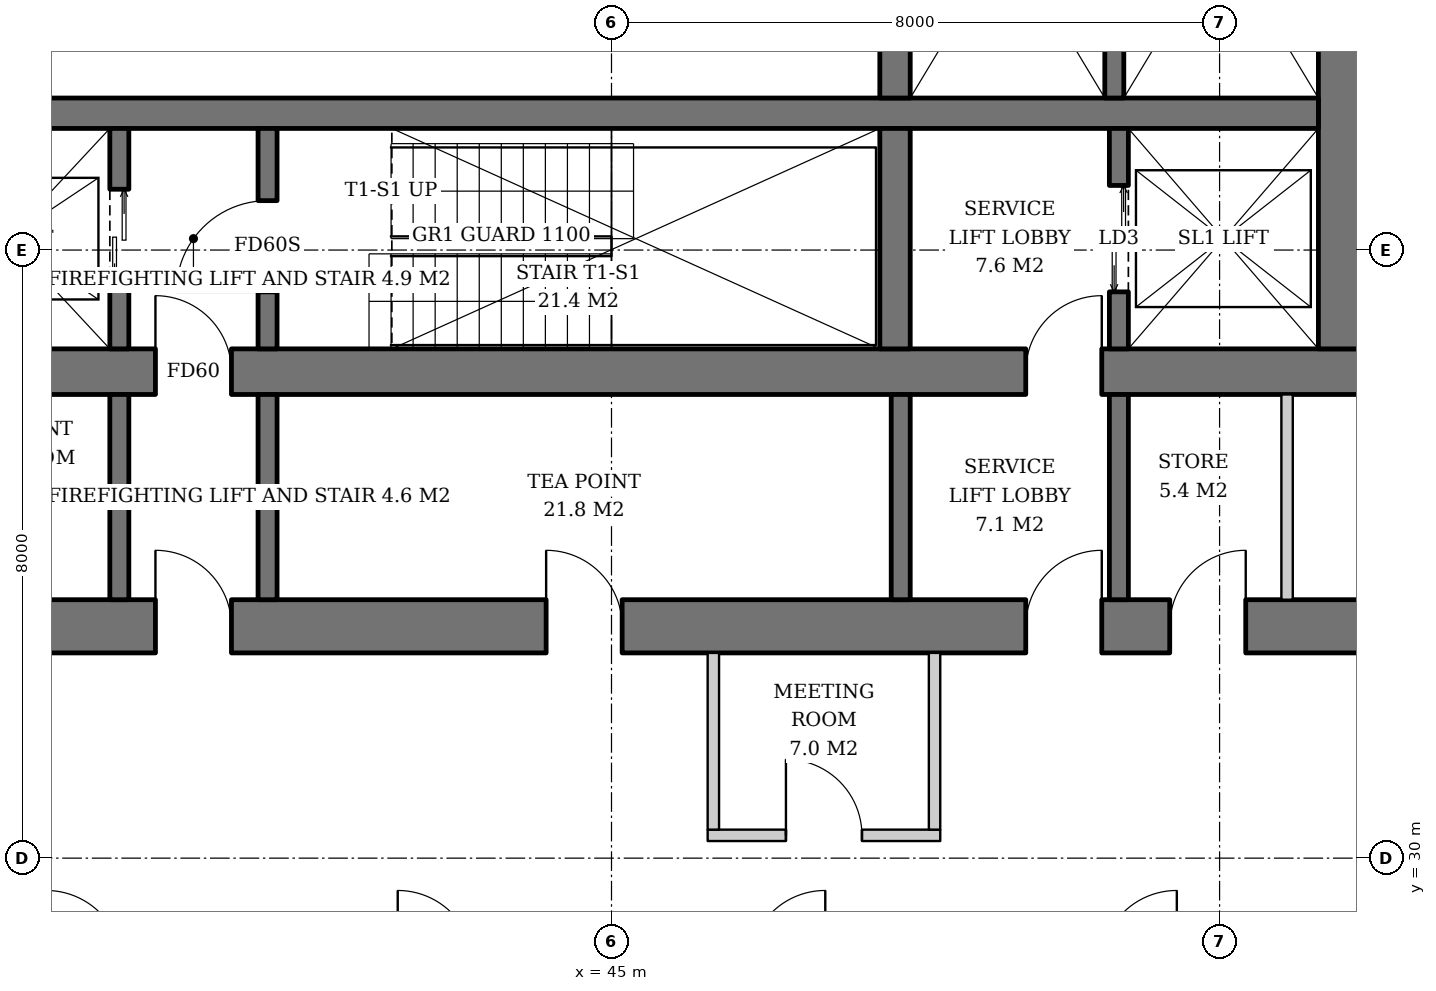
"""IFC4 building model, lengths in metres.
Left out: names, types, materials, properties, quantities, classifications, styles, units other than length and angle.
Written with IfcOpenShell. Run it as: python <this file> out.ifc"""

import sys

from ifc_helpers import new_model, si_unit, direction, frame, frame_2d, origin, place, context, subcontext, project, spatial, rectangle, extrude, element, fill, save


model = new_model("IFC4")
c1 = context("Model", 3, precision=1e-05, world=origin(), true_north=direction((0.0, 1.0)))
c2 = subcontext(c1, "Body", "Model", "MODEL_VIEW")
j1 = project(units=[si_unit("LENGTHUNIT", "METRE"), si_unit("PLANEANGLEUNIT", "RADIAN")], contexts=[c1])
p1 = place(None, origin())
s1 = spatial("IfcSite", under=j1, at=p1, CompositionType="ELEMENT")
p2 = place(p1, origin())
s2 = spatial("IfcBuilding", under=s1, at=p2, CompositionType="ELEMENT")
p3 = place(p2, frame((0.0, 0.0, 150.2)))
s3 = spatial("IfcBuildingStorey", under=s2, at=p3, CompositionType="ELEMENT", Elevation=150.2)
p4 = place(p3, frame((35.1, 36.4, 0.0), z_axis=(0.0, 0.0, 1.0), x_axis=(1.0, 0.0, 0.0)))
e1 = element("IfcWall", 1, at=p4, inside=s3, PredefinedType="SHEAR", context=c2, shape_type="SweptSolid", body=[
    extrude(rectangle(XDim=19.8, YDim=0.6, at=frame_2d((9.9, 0.0))), origin(), (0.0, 0.0, 1.0), 3.8),
])
p5 = place(p4, frame((3.9, 0.0, 0.0)))
e2 = element("IfcOpeningElement", 2, at=p5, cuts=e1, PredefinedType="OPENING", context=c2, shape_type="SweptSolid", body=[
    extrude(rectangle(XDim=1.0, YDim=2.1, at=frame_2d((0.5, 1.05))), frame((0.0, 0.31, 0.0), z_axis=(0.0, -1.0, 0.0), x_axis=(1.0, 0.0, 0.0)), (0.0, 0.0, 1.0), 0.62),
])
p6 = place(p4, frame((15.35, 0.0, 0.0)))
e3 = element("IfcOpeningElement", 3, at=p6, cuts=e1, PredefinedType="OPENING", context=c2, shape_type="SweptSolid", body=[
    extrude(rectangle(XDim=1.0, YDim=2.1, at=frame_2d((0.5, 1.05))), frame((0.0, 0.31, 0.0), z_axis=(0.0, -1.0, 0.0), x_axis=(1.0, 0.0, 0.0)), (0.0, 0.0, 1.0), 0.62),
])
p7 = place(p3, frame((54.6, 36.7, 0.0), z_axis=(0.0, 0.0, 1.0), x_axis=(0.0, 1.0, 0.0)))
e4 = element("IfcWall", 4, at=p7, inside=s3, PredefinedType="SHEAR", context=c2, shape_type="SweptSolid", body=[
    extrude(rectangle(XDim=18.6, YDim=0.6, at=frame_2d((9.3, 0.0))), origin(), (0.0, 0.0, 1.0), 3.8),
])
p8 = place(p7, frame((8.4, 0.0, 0.0)))
e5 = element("IfcOpeningElement", 5, at=p8, cuts=e4, PredefinedType="OPENING", context=c2, shape_type="SweptSolid", body=[
    extrude(rectangle(XDim=1.8, YDim=2.4, at=frame_2d((0.9, 1.2))), frame((0.0, 0.31, 0.0), z_axis=(0.0, -1.0, 0.0), x_axis=(1.0, 0.0, 0.0)), (0.0, 0.0, 1.0), 0.62),
])
p9 = place(p3, frame((31.7, 33.05, 0.0), z_axis=(0.0, 0.0, 1.0), x_axis=(1.0, 0.0, 0.0)))
e6 = element("IfcWall", 6, at=p9, inside=s3, PredefinedType="SHEAR", context=c2, shape_type="SweptSolid", body=[
    extrude(rectangle(XDim=26.6, YDim=0.7, at=frame_2d((13.3, 0.0))), origin(), (0.0, 0.0, 1.0), 3.8),
])
p10 = place(p9, frame((7.3, 0.0, 0.0)))
e7 = element("IfcOpeningElement", 7, at=p10, cuts=e6, PredefinedType="OPENING", context=c2, shape_type="SweptSolid", body=[
    extrude(rectangle(XDim=1.0, YDim=2.1, at=frame_2d((0.5, 1.05))), frame((0.0, 0.36, 0.0), z_axis=(0.0, -1.0, 0.0), x_axis=(1.0, 0.0, 0.0)), (0.0, 0.0, 1.0), 0.72),
])
p11 = place(p9, frame((18.75, 0.0, 0.0)))
e8 = element("IfcOpeningElement", 8, at=p11, cuts=e6, PredefinedType="OPENING", context=c2, shape_type="SweptSolid", body=[
    extrude(rectangle(XDim=1.0, YDim=2.1, at=frame_2d((0.5, 1.05))), frame((0.0, 0.36, 0.0), z_axis=(0.0, -1.0, 0.0), x_axis=(1.0, 0.0, 0.0)), (0.0, 0.0, 1.0), 0.72),
])
p12 = place(p9, frame((1.85, 0.0, 0.0)))
e9 = element("IfcOpeningElement", 9, at=p12, cuts=e6, PredefinedType="OPENING", context=c2, shape_type="SweptSolid", body=[
    extrude(rectangle(XDim=1.0, YDim=2.1, at=frame_2d((0.5, 1.05))), frame((0.0, 0.36, 0.0), z_axis=(0.0, -1.0, 0.0), x_axis=(1.0, 0.0, 0.0)), (0.0, 0.0, 1.0), 0.72),
])
p13 = place(p9, frame((4.7, 0.0, 0.0)))
e10 = element("IfcOpeningElement", 10, at=p13, cuts=e6, PredefinedType="OPENING", context=c2, shape_type="SweptSolid", body=[
    extrude(rectangle(XDim=1.0, YDim=2.1, at=frame_2d((0.5, 1.05))), frame((0.0, 0.36, 0.0), z_axis=(0.0, -1.0, 0.0), x_axis=(1.0, 0.0, 0.0)), (0.0, 0.0, 1.0), 0.72),
])
p14 = place(p9, frame((12.44, 0.0, 0.0)))
e11 = element("IfcOpeningElement", 11, at=p14, cuts=e6, PredefinedType="OPENING", context=c2, shape_type="SweptSolid", body=[
    extrude(rectangle(XDim=1.0, YDim=2.1, at=frame_2d((0.5, 1.05))), frame((0.0, 0.36, 0.0), z_axis=(0.0, -1.0, 0.0), x_axis=(1.0, 0.0, 0.0)), (0.0, 0.0, 1.0), 0.72),
])
p15 = place(p9, frame((20.644, 0.0, 0.0)))
e12 = element("IfcOpeningElement", 12, at=p15, cuts=e6, PredefinedType="OPENING", context=c2, shape_type="SweptSolid", body=[
    extrude(rectangle(XDim=1.0, YDim=2.1, at=frame_2d((0.5, 1.05))), frame((0.0, 0.36, 0.0), z_axis=(0.0, -1.0, 0.0), x_axis=(1.0, 0.0, 0.0)), (0.0, 0.0, 1.0), 0.72),
])
p16 = place(p9, frame((23.544, 0.0, 0.0)))
e13 = element("IfcOpeningElement", 13, at=p16, cuts=e6, PredefinedType="OPENING", context=c2, shape_type="SweptSolid", body=[
    extrude(rectangle(XDim=1.0, YDim=2.1, at=frame_2d((0.5, 1.05))), frame((0.0, 0.36, 0.0), z_axis=(0.0, -1.0, 0.0), x_axis=(1.0, 0.0, 0.0)), (0.0, 0.0, 1.0), 0.72),
])
p17 = place(p3, frame((35.7, 39.8, 0.0), z_axis=(0.0, 0.0, 1.0), x_axis=(1.0, 0.0, 0.0)))
e14 = element("IfcWall", 14, at=p17, inside=s3, PredefinedType="SHEAR", context=c2, shape_type="SweptSolid", body=[
    extrude(rectangle(XDim=18.6, YDim=0.4, at=frame_2d((9.3, 0.0))), origin(), (0.0, 0.0, 1.0), 3.8),
])
p18 = place(p3, frame((48.73, 36.7, 0.0), z_axis=(0.0, 0.0, 1.0), x_axis=(0.0, 1.0, 0.0)))
e15 = element("IfcWall", 15, at=p18, inside=s3, PredefinedType="SHEAR", context=c2, shape_type="SweptSolid", body=[
    extrude(rectangle(XDim=2.9, YDim=0.4, at=frame_2d((1.45, 0.0))), origin(), (0.0, 0.0, 1.0), 3.8),
])
p19 = place(p3, frame((48.73, 40.0, 0.0), z_axis=(0.0, 0.0, 1.0), x_axis=(0.0, 1.0, 0.0)))
e16 = element("IfcWall", 16, at=p19, inside=s3, PredefinedType="SHEAR", context=c2, shape_type="SweptSolid", body=[
    extrude(rectangle(XDim=12.0, YDim=0.4, at=frame_2d((6.0, 0.0))), origin(), (0.0, 0.0, 1.0), 3.8),
])
p20 = place(p3, frame((38.525, 36.7, 0.0), z_axis=(0.0, 0.0, 1.0), x_axis=(0.0, 1.0, 0.0)))
e17 = element("IfcWall", 17, at=p20, inside=s3, PredefinedType="SHEAR", context=c2, shape_type="SweptSolid", body=[
    extrude(rectangle(XDim=2.9, YDim=0.25, at=frame_2d((1.45, 0.0))), origin(), (0.0, 0.0, 1.0), 3.8),
])
p21 = place(p20, frame((0.8, 0.0, 0.0)))
e18 = element("IfcOpeningElement", 18, at=p21, cuts=e17, PredefinedType="OPENING", context=c2, shape_type="SweptSolid", body=[
    extrude(rectangle(XDim=1.3, YDim=2.2, at=frame_2d((0.65, 1.1))), frame((0.0, 0.135, 0.0), z_axis=(0.0, -1.0, 0.0), x_axis=(1.0, 0.0, 0.0)), (0.0, 0.0, 1.0), 0.27),
])
p22 = place(p3, frame((40.475, 36.7, 0.0), z_axis=(0.0, 0.0, 1.0), x_axis=(0.0, 1.0, 0.0)))
e19 = element("IfcWall", 19, at=p22, inside=s3, PredefinedType="SHEAR", context=c2, shape_type="SweptSolid", body=[
    extrude(rectangle(XDim=2.9, YDim=0.25, at=frame_2d((1.45, 0.0))), origin(), (0.0, 0.0, 1.0), 3.8),
])
p23 = place(p22, frame((0.75, 0.0, 0.0)))
e20 = element("IfcOpeningElement", 20, at=p23, cuts=e19, PredefinedType="OPENING", context=c2, shape_type="SweptSolid", body=[
    extrude(rectangle(XDim=1.2, YDim=2.1, at=frame_2d((0.6, 1.05))), frame((0.0, 0.135, 0.0), z_axis=(0.0, -1.0, 0.0), x_axis=(1.0, 0.0, 0.0)), (0.0, 0.0, 1.0), 0.27),
])
p24 = place(p3, frame((51.675, 36.7, 0.0), z_axis=(0.0, 0.0, 1.0), x_axis=(0.0, 1.0, 0.0)))
e21 = element("IfcWall", 21, at=p24, inside=s3, PredefinedType="SHEAR", context=c2, shape_type="SweptSolid", body=[
    extrude(rectangle(XDim=2.9, YDim=0.25, at=frame_2d((1.45, 0.0))), origin(), (0.0, 0.0, 1.0), 3.8),
])
p25 = place(p24, frame((0.75, 0.0, 0.0)))
e22 = element("IfcOpeningElement", 22, at=p25, cuts=e21, PredefinedType="OPENING", context=c2, shape_type="SweptSolid", body=[
    extrude(rectangle(XDim=1.4, YDim=2.4, at=frame_2d((0.7, 1.2))), frame((0.0, 0.135, 0.0), z_axis=(0.0, -1.0, 0.0), x_axis=(1.0, 0.0, 0.0)), (0.0, 0.0, 1.0), 0.27),
])
p26 = place(p3, frame((51.615, 44.25, 0.0), z_axis=(0.0, 0.0, 1.0), x_axis=(0.0, -1.0, 0.0)))
e23 = element("IfcWall", 23, at=p26, inside=s3, PredefinedType="SHEAR", context=c2, shape_type="SweptSolid", body=[
    extrude(rectangle(XDim=4.25, YDim=0.25, at=frame_2d((2.125, 0.0))), origin(), (0.0, 0.0, 1.0), 3.8),
])
for number, where, z_axis, x_axis in (
    (24, (38.525, 33.4, 0.0), (0.0, 0.0, 1.0), (0.0, 1.0, 0.0)),
    (25, (40.475, 33.4, 0.0), (0.0, 0.0, 1.0), (0.0, 1.0, 0.0)),
    (26, (48.805, 33.4, 0.0), (0.0, 0.0, 1.0), (0.0, 1.0, 0.0)),
    (27, (51.675, 33.4, 0.0), (0.0, 0.0, 1.0), (0.0, 1.0, 0.0)),
):
    element("IfcWall", number, at=place(p3, frame(where, z_axis=z_axis, x_axis=x_axis)), inside=s3, PredefinedType="SOLIDWALL", context=c2, shape_type="SweptSolid", body=[
        extrude(rectangle(XDim=2.7, YDim=0.25, at=frame_2d((1.35, 0.0))), origin(), (0.0, 0.0, 1.0), 3.62),
    ])
p27 = place(p3, frame((53.888, 33.4, 0.0), z_axis=(0.0, 0.0, 1.0), x_axis=(0.0, 1.0, 0.0)))
e28 = element("IfcWall", 28, at=p27, inside=s3, PredefinedType="SOLIDWALL", context=c2, shape_type="SweptSolid", body=[
    extrude(rectangle(XDim=2.7, YDim=0.15, at=frame_2d((1.35, 0.0))), origin(), (0.0, 0.0, 1.0), 3.62),
])
p28 = place(p3, frame((46.265, 30.3, 0.0), z_axis=(0.0, 0.0, 1.0), x_axis=(1.0, 0.0, 0.0)))
e29 = element("IfcWall", 29, at=p28, inside=s3, PredefinedType="PARTITIONING", context=c2, shape_type="SweptSolid", body=[
    extrude(rectangle(XDim=3.06, YDim=0.15, at=frame_2d((1.53, 0.0))), origin(), (0.0, 0.0, 1.0), 2.858),
])
p29 = place(p28, frame((1.03, 0.0, 0.0)))
e30 = element("IfcOpeningElement", 30, at=p29, cuts=e29, PredefinedType="OPENING", context=c2, shape_type="SweptSolid", body=[
    extrude(rectangle(XDim=1.0, YDim=2.1, at=frame_2d((0.5, 1.05))), frame((0.0, 0.085, 0.0), z_axis=(0.0, -1.0, 0.0), x_axis=(1.0, 0.0, 0.0)), (0.0, 0.0, 1.0), 0.17),
])
for number, where, z_axis, x_axis in (
    (31, (46.34, 32.7, 0.0), (0.0, 0.0, 1.0), (0.0, -1.0, 0.0)),
    (32, (49.25, 32.7, 0.0), (0.0, 0.0, 1.0), (0.0, -1.0, 0.0)),
):
    element("IfcWall", number, at=place(p3, frame(where, z_axis=z_axis, x_axis=x_axis)), inside=s3, PredefinedType="PARTITIONING", context=c2, shape_type="SweptSolid", body=[
        extrude(rectangle(XDim=2.325, YDim=0.15, at=frame_2d((1.163, 0.0))), origin(), (0.0, 0.0, 1.0), 3.62),
    ])
p30 = place(p21, origin())
e33 = element("IfcDoor", 33, at=p30, inside=s3, OperationType="DOUBLE_DOOR_SLIDING", PredefinedType="DOOR", context=c2, shape_type="SweptSolid", body=[
    extrude(rectangle(XDim=1.3, YDim=2.2, at=frame_2d((0.65, 1.1))), frame((0.0, 0.025, 0.0), z_axis=(0.0, -1.0, 0.0), x_axis=(1.0, 0.0, 0.0)), (0.0, 0.0, 1.0), 0.05),
])
fill(e18, e33)
p31 = place(p23, origin())
e34 = element("IfcDoor", 34, at=p31, inside=s3, OperationType="SINGLE_SWING_LEFT", PredefinedType="DOOR", context=c2, shape_type="SweptSolid", body=[
    extrude(rectangle(XDim=1.2, YDim=2.1, at=frame_2d((0.6, 1.05))), frame((0.0, 0.025, 0.0), z_axis=(0.0, -1.0, 0.0), x_axis=(1.0, 0.0, 0.0)), (0.0, 0.0, 1.0), 0.05),
])
fill(e20, e34)
p32 = place(p25, origin())
e35 = element("IfcDoor", 35, at=p32, inside=s3, OperationType="DOUBLE_DOOR_SLIDING", PredefinedType="DOOR", context=c2, shape_type="SweptSolid", body=[
    extrude(rectangle(XDim=1.4, YDim=2.4, at=frame_2d((0.7, 1.2))), frame((0.0, 0.025, 0.0), z_axis=(0.0, -1.0, 0.0), x_axis=(1.0, 0.0, 0.0)), (0.0, 0.0, 1.0), 0.05),
])
fill(e22, e35)
p33 = place(p5, origin())
e36 = element("IfcDoor", 36, at=p33, inside=s3, OperationType="SINGLE_SWING_LEFT", PredefinedType="DOOR", context=c2, shape_type="SweptSolid", body=[
    extrude(rectangle(XDim=1.0, YDim=2.1, at=frame_2d((0.5, 1.05))), frame((0.0, 0.025, 0.0), z_axis=(0.0, -1.0, 0.0), x_axis=(1.0, 0.0, 0.0)), (0.0, 0.0, 1.0), 0.05),
])
fill(e2, e36)
p34 = place(p6, origin())
e37 = element("IfcDoor", 37, at=p34, inside=s3, OperationType="SINGLE_SWING_RIGHT", PredefinedType="DOOR", context=c2, shape_type="SweptSolid", body=[
    extrude(rectangle(XDim=1.0, YDim=2.1, at=frame_2d((0.5, 1.05))), frame((0.0, 0.025, 0.0), z_axis=(0.0, -1.0, 0.0), x_axis=(1.0, 0.0, 0.0)), (0.0, 0.0, 1.0), 0.05),
])
fill(e3, e37)
p35 = place(p10, origin())
e38 = element("IfcDoor", 38, at=p35, inside=s3, OperationType="SINGLE_SWING_LEFT", PredefinedType="DOOR", context=c2, shape_type="SweptSolid", body=[
    extrude(rectangle(XDim=1.0, YDim=2.1, at=frame_2d((0.5, 1.05))), frame((0.0, 0.025, 0.0), z_axis=(0.0, -1.0, 0.0), x_axis=(1.0, 0.0, 0.0)), (0.0, 0.0, 1.0), 0.05),
])
fill(e7, e38)
p36 = place(p11, origin())
e39 = element("IfcDoor", 39, at=p36, inside=s3, OperationType="SINGLE_SWING_RIGHT", PredefinedType="DOOR", context=c2, shape_type="SweptSolid", body=[
    extrude(rectangle(XDim=1.0, YDim=2.1, at=frame_2d((0.5, 1.05))), frame((0.0, 0.025, 0.0), z_axis=(0.0, -1.0, 0.0), x_axis=(1.0, 0.0, 0.0)), (0.0, 0.0, 1.0), 0.05),
])
fill(e8, e39)
p37 = place(p14, origin())
e40 = element("IfcDoor", 40, at=p37, inside=s3, OperationType="SINGLE_SWING_LEFT", PredefinedType="DOOR", context=c2, shape_type="SweptSolid", body=[
    extrude(rectangle(XDim=1.0, YDim=2.1, at=frame_2d((0.5, 1.05))), frame((0.0, 0.34, 0.0), z_axis=(0.0, -1.0, 0.0), x_axis=(1.0, 0.0, 0.0)), (0.0, 0.0, 1.0), 0.05),
])
fill(e11, e40)
p38 = place(p15, origin())
e41 = element("IfcDoor", 41, at=p38, inside=s3, OperationType="SINGLE_SWING_RIGHT", PredefinedType="DOOR", context=c2, shape_type="SweptSolid", body=[
    extrude(rectangle(XDim=1.0, YDim=2.1, at=frame_2d((0.5, 1.05))), frame((0.0, 0.34, 0.0), z_axis=(0.0, -1.0, 0.0), x_axis=(1.0, 0.0, 0.0)), (0.0, 0.0, 1.0), 0.05),
])
fill(e12, e41)
p39 = place(p29, origin())
e42 = element("IfcDoor", 42, at=p39, inside=s3, OperationType="SINGLE_SWING_LEFT", PredefinedType="DOOR", context=c2, shape_type="SweptSolid", body=[
    extrude(rectangle(XDim=1.0, YDim=2.1, at=frame_2d((0.5, 1.05))), frame((0.0, 0.025, 0.0), z_axis=(0.0, -1.0, 0.0), x_axis=(1.0, 0.0, 0.0)), (0.0, 0.0, 1.0), 0.05),
])
fill(e30, e42)
save(model, sys.argv[1])
